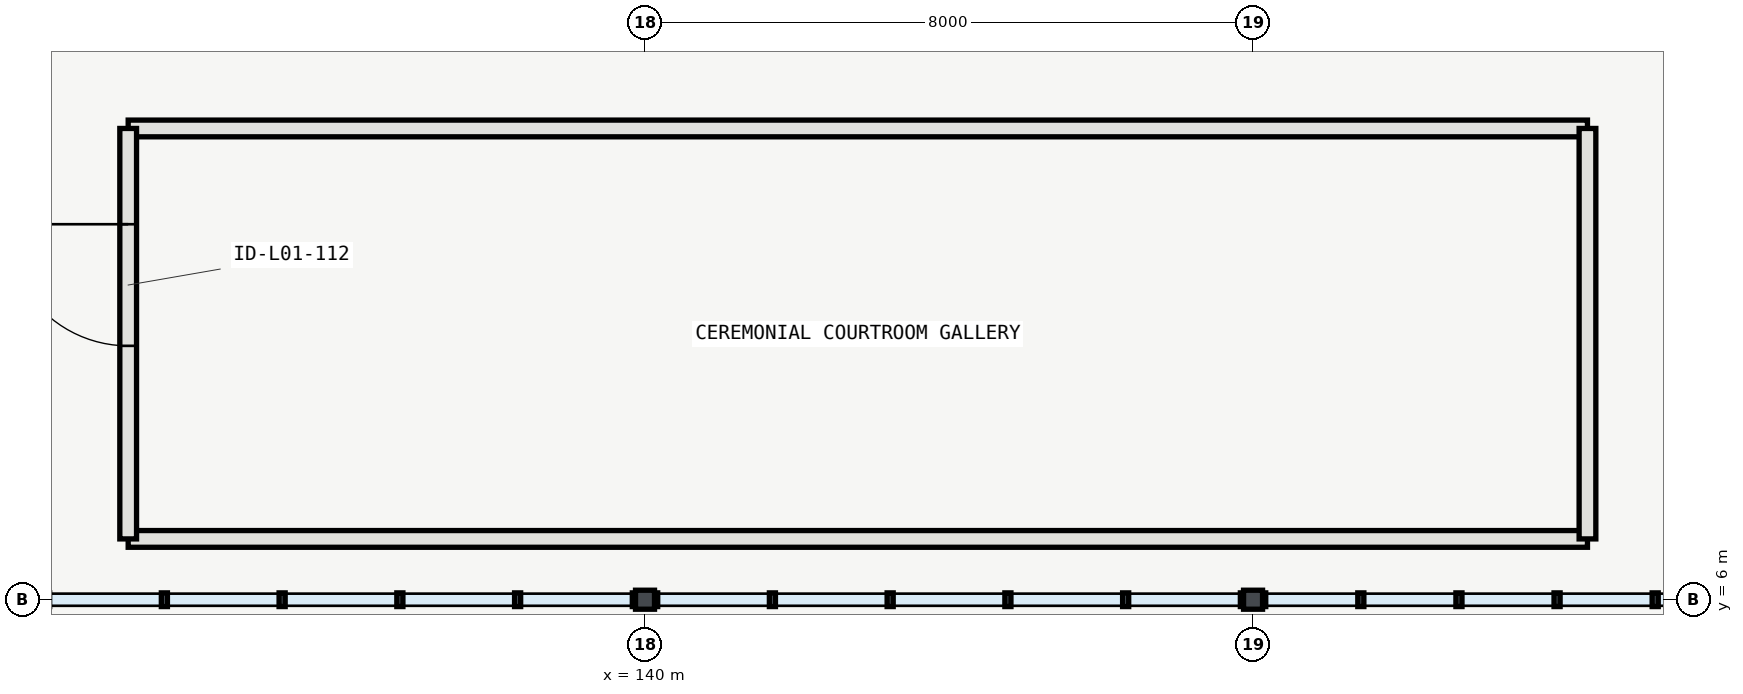
"""IFC4 building model, lengths in metres.
Left out: names, types, materials, properties, quantities, classifications, styles, units other than length and angle.
Written with IfcOpenShell. Run it as: python <this file> out.ifc"""

import sys

from ifc_helpers import new_model, si_unit, direction, frame, frame_2d, origin, origin_2d, place, context, subcontext, project, spatial, rectangle, i_section, extrude, element, fill, save


model = new_model("IFC4")
c1 = context("Model", 3, precision=1e-05, world=origin(), true_north=direction((0.0, 1.0)))
c2 = subcontext(c1, "Body", "Model", "MODEL_VIEW")
j1 = project(units=[si_unit("LENGTHUNIT", "METRE"), si_unit("PLANEANGLEUNIT", "RADIAN")], contexts=[c1])
p1 = place(None, origin())
s1 = spatial("IfcSite", under=j1, at=p1, CompositionType="ELEMENT")
p2 = place(p1, origin())
s2 = spatial("IfcBuilding", under=s1, at=p2, CompositionType="ELEMENT")
p3 = place(p2, frame((0.0, 0.0, 5.4)))
s3 = spatial("IfcBuildingStorey", under=s2, at=p3, CompositionType="ELEMENT", Elevation=5.4)
for number, where, z_axis, x_axis in (
    (1, (140.0, 6.0, 0.0), (0.0, 0.0, 1.0), (1.0, 0.0, 0.0)),
    (2, (148.0, 6.0, 0.0), (0.0, 0.0, 1.0), (1.0, 0.0, 0.0)),
):
    element("IfcColumn", number, at=place(p3, frame(where, z_axis=z_axis, x_axis=x_axis)), inside=s3, PredefinedType="COLUMN", context=c2, shape_type="SweptSolid", body=[
        extrude(i_section(OverallWidth=0.25, OverallDepth=0.25, WebThickness=0.009, FlangeThickness=0.014, FilletRadius=0.016, at=origin_2d()), origin(), (0.0, 0.0, 1.0), 5.4),
    ])
for number, where, z_axis, x_axis in (
    (3, (133.2, 6.8, 0.0), (0.0, 0.0, 1.0), (1.0, 0.0, 0.0)),
    (4, (152.4, 12.2, 0.0), (0.0, 0.0, 1.0), (-1.0, 0.0, 0.0)),
):
    element("IfcWall", number, at=place(p3, frame(where, z_axis=z_axis, x_axis=x_axis)), inside=s3, PredefinedType="PARTITIONING", context=c2, shape_type="SweptSolid", body=[
        extrude(rectangle(XDim=19.2, YDim=0.22, at=frame_2d((9.6, 0.0))), origin(), (0.0, 0.0, 1.0), 5.12),
    ])
p4 = place(p3, frame((133.2, 12.2, 0.0), z_axis=(0.0, 0.0, 1.0), x_axis=(0.0, -1.0, 0.0)))
e5 = element("IfcWall", 5, at=p4, inside=s3, PredefinedType="PARTITIONING", context=c2, shape_type="SweptSolid", body=[
    extrude(rectangle(XDim=5.4, YDim=0.22, at=frame_2d((2.7, 0.0))), origin(), (0.0, 0.0, 1.0), 5.12),
])
p5 = place(p4, frame((1.26, 0.0, 0.0)))
e6 = element("IfcOpeningElement", 6, at=p5, cuts=e5, PredefinedType="OPENING", context=c2, shape_type="SweptSolid", body=[
    extrude(rectangle(XDim=1.6, YDim=2.35, at=frame_2d((0.8, 1.175))), frame((0.0, 0.12, 0.0), z_axis=(0.0, -1.0, 0.0), x_axis=(1.0, 0.0, 0.0)), (0.0, 0.0, 1.0), 0.24),
])
p6 = place(p3, frame((152.4, 6.8, 0.0), z_axis=(0.0, 0.0, 1.0), x_axis=(0.0, 1.0, 0.0)))
e7 = element("IfcWall", 7, at=p6, inside=s3, PredefinedType="PARTITIONING", context=c2, shape_type="SweptSolid", body=[
    extrude(rectangle(XDim=5.4, YDim=0.22, at=frame_2d((2.7, 0.0))), origin(), (0.0, 0.0, 1.0), 5.12),
])
p7 = place(p5, origin())
e8 = element("IfcDoor", 8, at=p7, inside=s3, OperationType="DOUBLE_DOOR_SINGLE_SWING", PredefinedType="DOOR", context=c2, shape_type="SweptSolid", body=[
    extrude(rectangle(XDim=1.6, YDim=2.35, at=frame_2d((0.8, 1.175))), frame((0.0, 0.025, 0.0), z_axis=(0.0, -1.0, 0.0), x_axis=(1.0, 0.0, 0.0)), (0.0, 0.0, 1.0), 0.05),
])
fill(e6, e8)
save(model, sys.argv[1])
